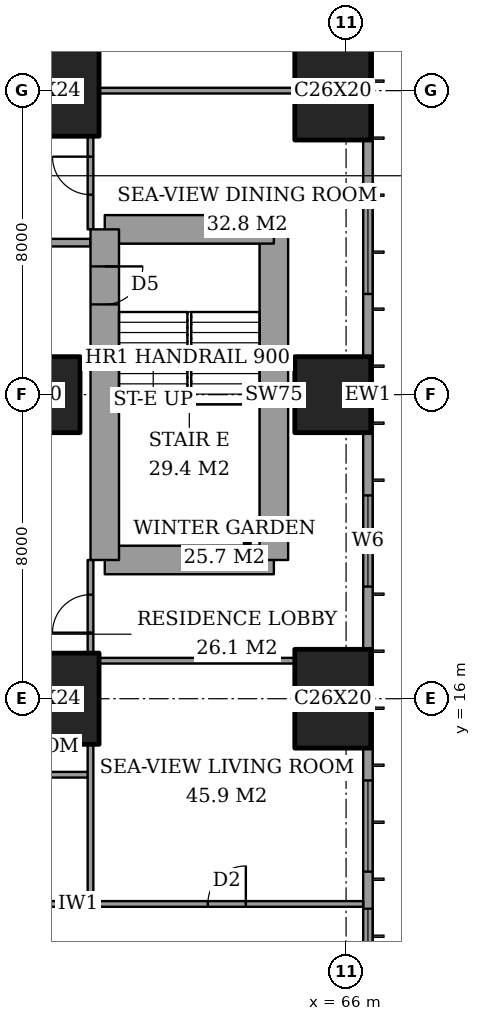
"""IFC4 building model, lengths in metres.
Left out: names, types, materials, properties, quantities, classifications, styles, units other than length and angle.
Written with IfcOpenShell. Run it as: python <this file> out.ifc"""

import sys

from ifc_helpers import new_model, si_unit, direction, frame, frame_2d, origin, origin_2d, place, context, subcontext, project, spatial, rectangle, extrude, element, fill, save


model = new_model("IFC4")
c1 = context("Model", 3, precision=1e-05, world=origin(), true_north=direction((0.0, 1.0)))
c2 = subcontext(c1, "Body", "Model", "MODEL_VIEW")
j1 = project(units=[si_unit("LENGTHUNIT", "METRE"), si_unit("PLANEANGLEUNIT", "RADIAN")], contexts=[c1])
p1 = place(None, origin())
s1 = spatial("IfcSite", under=j1, at=p1, CompositionType="ELEMENT")
p2 = place(p1, origin())
s2 = spatial("IfcBuilding", under=s1, at=p2, CompositionType="ELEMENT")
p3 = place(p2, frame((0.0, 0.0, 87.2)))
s3 = spatial("IfcBuildingStorey", under=s2, at=p3, CompositionType="ELEMENT", Elevation=87.2)
p4 = place(p3, frame((58.0, 16.0, 0.0), z_axis=(0.0, 0.0, 1.0), x_axis=(1.0, 0.0, 0.0)))
e1 = element("IfcColumn", 1, at=p4, inside=s3, PredefinedType="COLUMN", context=c2, shape_type="SweptSolid", body=[
    extrude(rectangle(XDim=3.0, YDim=2.4, at=origin_2d()), origin(), (0.0, 0.0, 1.0), 3.6),
])
p5 = place(p3, frame((58.0, 24.0, 0.0), z_axis=(0.0, 0.0, 1.0), x_axis=(1.0, 0.0, 0.0)))
e2 = element("IfcColumn", 2, at=p5, inside=s3, PredefinedType="COLUMN", context=c2, shape_type="SweptSolid", body=[
    extrude(rectangle(XDim=2.0, YDim=2.0, at=origin_2d()), origin(), (0.0, 0.0, 1.0), 3.6),
])
p6 = place(p3, frame((58.0, 32.0, 0.0), z_axis=(0.0, 0.0, 1.0), x_axis=(1.0, 0.0, 0.0)))
e3 = element("IfcColumn", 3, at=p6, inside=s3, PredefinedType="COLUMN", context=c2, shape_type="SweptSolid", body=[
    extrude(rectangle(XDim=3.0, YDim=2.4, at=origin_2d()), origin(), (0.0, 0.0, 1.0), 3.6),
])
p7 = place(p3, frame((65.65, 16.0, 0.0), z_axis=(0.0, 0.0, 1.0), x_axis=(0.0, 1.0, 0.0)))
e4 = element("IfcColumn", 4, at=p7, inside=s3, PredefinedType="COLUMN", context=c2, shape_type="SweptSolid", body=[
    extrude(rectangle(XDim=2.6, YDim=2.0, at=origin_2d()), origin(), (0.0, 0.0, 1.0), 3.6),
])
p8 = place(p3, frame((65.65, 24.0, 0.0), z_axis=(0.0, 0.0, 1.0), x_axis=(1.0, 0.0, 0.0)))
e5 = element("IfcColumn", 5, at=p8, inside=s3, PredefinedType="COLUMN", context=c2, shape_type="SweptSolid", body=[
    extrude(rectangle(XDim=2.0, YDim=2.0, at=origin_2d()), origin(), (0.0, 0.0, 1.0), 3.6),
])
p9 = place(p3, frame((65.65, 32.0, 0.0), z_axis=(0.0, 0.0, 1.0), x_axis=(0.0, 1.0, 0.0)))
e6 = element("IfcColumn", 6, at=p9, inside=s3, PredefinedType="COLUMN", context=c2, shape_type="SweptSolid", body=[
    extrude(rectangle(XDim=2.6, YDim=2.0, at=origin_2d()), origin(), (0.0, 0.0, 1.0), 3.6),
])
p10 = place(p3, frame((59.65, 19.65, 0.0), z_axis=(0.0, 0.0, 1.0), x_axis=(1.0, 0.0, 0.0)))
e7 = element("IfcWall", 7, at=p10, inside=s3, PredefinedType="SHEAR", context=c2, shape_type="SweptSolid", body=[
    extrude(rectangle(XDim=4.45, YDim=0.75, at=frame_2d((2.225, 0.0))), origin(), (0.0, 0.0, 1.0), 3.6),
])
p11 = place(p3, frame((64.1, 19.65, 0.0), z_axis=(0.0, 0.0, 1.0), x_axis=(0.0, 1.0, 0.0)))
e8 = element("IfcWall", 8, at=p11, inside=s3, PredefinedType="SHEAR", context=c2, shape_type="SweptSolid", body=[
    extrude(rectangle(XDim=8.7, YDim=0.75, at=frame_2d((4.35, 0.0))), origin(), (0.0, 0.0, 1.0), 3.6),
])
p12 = place(p3, frame((64.1, 28.35, 0.0), z_axis=(0.0, 0.0, 1.0), x_axis=(-1.0, 0.0, 0.0)))
e9 = element("IfcWall", 9, at=p12, inside=s3, PredefinedType="SHEAR", context=c2, shape_type="SweptSolid", body=[
    extrude(rectangle(XDim=4.45, YDim=0.75, at=frame_2d((2.225, 0.0))), origin(), (0.0, 0.0, 1.0), 3.6),
])
p13 = place(p3, frame((59.65, 28.35, 0.0), z_axis=(0.0, 0.0, 1.0), x_axis=(0.0, -1.0, 0.0)))
e10 = element("IfcWall", 10, at=p13, inside=s3, PredefinedType="SHEAR", context=c2, shape_type="SweptSolid", body=[
    extrude(rectangle(XDim=8.7, YDim=0.75, at=frame_2d((4.35, 0.0))), origin(), (0.0, 0.0, 1.0), 3.6),
])
p14 = place(p13, frame((0.975, 0.0, 0.0)))
e11 = element("IfcOpeningElement", 11, at=p14, cuts=e10, PredefinedType="OPENING", context=c2, shape_type="SweptSolid", body=[
    extrude(rectangle(XDim=1.0, YDim=2.1, at=frame_2d((0.5, 1.05))), frame((0.0, 0.385, 0.0), z_axis=(0.0, -1.0, 0.0), x_axis=(1.0, 0.0, 0.0)), (0.0, 0.0, 1.0), 0.77),
])
p15 = place(p3, frame((66.575, 3.175, 0.0), z_axis=(0.0, 0.0, 1.0), x_axis=(0.0, 1.0, 0.0)))
e12 = element("IfcWall", 12, at=p15, inside=s3, PredefinedType="SOLIDWALL", context=c2, shape_type="SweptSolid", body=[
    extrude(rectangle(XDim=41.65, YDim=0.25, at=frame_2d((20.825, 0.0))), origin(), (0.0, 0.0, 1.0), 3.6),
])
p16 = place(p15, frame((0.775, 0.0, 0.6)))
e13 = element("IfcOpeningElement", 13, at=p16, cuts=e12, PredefinedType="OPENING", context=c2, shape_type="SweptSolid", body=[
    extrude(rectangle(XDim=2.4, YDim=2.0, at=frame_2d((1.2, 1.0))), frame((0.0, 0.135, 0.0), z_axis=(0.0, -1.0, 0.0), x_axis=(1.0, 0.0, 0.0)), (0.0, 0.0, 1.0), 0.27),
])
p17 = place(p15, frame((6.1, 0.0, 0.6)))
e14 = element("IfcOpeningElement", 14, at=p17, cuts=e12, PredefinedType="OPENING", context=c2, shape_type="SweptSolid", body=[
    extrude(rectangle(XDim=1.2, YDim=2.0, at=frame_2d((0.6, 1.0))), frame((0.0, 0.135, 0.0), z_axis=(0.0, -1.0, 0.0), x_axis=(1.0, 0.0, 0.0)), (0.0, 0.0, 1.0), 0.27),
])
p18 = place(p15, frame((8.275, 0.0, 0.6)))
e15 = element("IfcOpeningElement", 15, at=p18, cuts=e12, PredefinedType="OPENING", context=c2, shape_type="SweptSolid", body=[
    extrude(rectangle(XDim=2.4, YDim=2.0, at=frame_2d((1.2, 1.0))), frame((0.0, 0.135, 0.0), z_axis=(0.0, -1.0, 0.0), x_axis=(1.0, 0.0, 0.0)), (0.0, 0.0, 1.0), 0.27),
])
p19 = place(p15, frame((15.775, 0.0, 0.6)))
e16 = element("IfcOpeningElement", 16, at=p19, cuts=e12, PredefinedType="OPENING", context=c2, shape_type="SweptSolid", body=[
    extrude(rectangle(XDim=2.4, YDim=2.0, at=frame_2d((1.2, 1.0))), frame((0.0, 0.135, 0.0), z_axis=(0.0, -1.0, 0.0), x_axis=(1.0, 0.0, 0.0)), (0.0, 0.0, 1.0), 0.27),
])
p20 = place(p15, frame((23.475, 0.0, 0.6)))
e17 = element("IfcOpeningElement", 17, at=p20, cuts=e12, PredefinedType="OPENING", context=c2, shape_type="SweptSolid", body=[
    extrude(rectangle(XDim=2.4, YDim=2.0, at=frame_2d((1.2, 1.0))), frame((0.0, 0.135, 0.0), z_axis=(0.0, -1.0, 0.0), x_axis=(1.0, 0.0, 0.0)), (0.0, 0.0, 1.0), 0.27),
])
p21 = place(p15, frame((30.975, 0.0, 0.6)))
e18 = element("IfcOpeningElement", 18, at=p21, cuts=e12, PredefinedType="OPENING", context=c2, shape_type="SweptSolid", body=[
    extrude(rectangle(XDim=2.4, YDim=2.0, at=frame_2d((1.2, 1.0))), frame((0.0, 0.135, 0.0), z_axis=(0.0, -1.0, 0.0), x_axis=(1.0, 0.0, 0.0)), (0.0, 0.0, 1.0), 0.27),
])
p22 = place(p15, frame((34.5, 0.0, 0.6)))
e19 = element("IfcOpeningElement", 19, at=p22, cuts=e12, PredefinedType="OPENING", context=c2, shape_type="SweptSolid", body=[
    extrude(rectangle(XDim=1.2, YDim=2.0, at=frame_2d((0.6, 1.0))), frame((0.0, 0.135, 0.0), z_axis=(0.0, -1.0, 0.0), x_axis=(1.0, 0.0, 0.0)), (0.0, 0.0, 1.0), 0.27),
])
p23 = place(p15, frame((38.475, 0.0, 0.6)))
e20 = element("IfcOpeningElement", 20, at=p23, cuts=e12, PredefinedType="OPENING", context=c2, shape_type="SweptSolid", body=[
    extrude(rectangle(XDim=2.4, YDim=2.0, at=frame_2d((1.2, 1.0))), frame((0.0, 0.135, 0.0), z_axis=(0.0, -1.0, 0.0), x_axis=(1.0, 0.0, 0.0)), (0.0, 0.0, 1.0), 0.27),
])
p24 = place(p3, frame((41.439, 10.6, 0.0), z_axis=(0.0, 0.0, 1.0), x_axis=(1.0, 0.0, 0.0)))
e21 = element("IfcWall", 21, at=p24, inside=s3, PredefinedType="PARTITIONING", context=c2, shape_type="SweptSolid", body=[
    extrude(rectangle(XDim=25.011, YDim=0.15, at=frame_2d((12.505, 0.0))), origin(), (0.0, 0.0, 1.0), 3.25),
])
p25 = place(p24, frame((10.761, 0.0, 0.0)))
e22 = element("IfcOpeningElement", 22, at=p25, cuts=e21, PredefinedType="OPENING", context=c2, shape_type="SweptSolid", body=[
    extrude(rectangle(XDim=1.0, YDim=2.1, at=frame_2d((0.5, 1.05))), frame((0.0, 0.085, 0.0), z_axis=(0.0, -1.0, 0.0), x_axis=(1.0, 0.0, 0.0)), (0.0, 0.0, 1.0), 0.17),
])
p26 = place(p24, frame((20.924, 0.0, 0.0)))
e23 = element("IfcOpeningElement", 23, at=p26, cuts=e21, PredefinedType="OPENING", context=c2, shape_type="SweptSolid", body=[
    extrude(rectangle(XDim=1.0, YDim=2.1, at=frame_2d((0.5, 1.05))), frame((0.0, 0.085, 0.0), z_axis=(0.0, -1.0, 0.0), x_axis=(1.0, 0.0, 0.0)), (0.0, 0.0, 1.0), 0.17),
])
p27 = place(p24, frame((15.749, 0.0, 0.0)))
e24 = element("IfcOpeningElement", 24, at=p27, cuts=e21, PredefinedType="OPENING", context=c2, shape_type="SweptSolid", body=[
    extrude(rectangle(XDim=0.9, YDim=2.1, at=frame_2d((0.45, 1.05))), frame((0.0, 0.085, 0.0), z_axis=(0.0, -1.0, 0.0), x_axis=(1.0, 0.0, 0.0)), (0.0, 0.0, 1.0), 0.17),
])
p28 = place(p24, frame((12.961, 0.0, 0.0)))
e25 = element("IfcOpeningElement", 25, at=p28, cuts=e21, PredefinedType="OPENING", context=c2, shape_type="SweptSolid", body=[
    extrude(rectangle(XDim=1.0, YDim=2.1, at=frame_2d((0.5, 1.05))), frame((0.0, 0.085, 0.0), z_axis=(0.0, -1.0, 0.0), x_axis=(1.0, 0.0, 0.0)), (0.0, 0.0, 1.0), 0.17),
])
p29 = place(p24, frame((7.861, 0.0, 0.0)))
e26 = element("IfcOpeningElement", 26, at=p29, cuts=e21, PredefinedType="OPENING", context=c2, shape_type="SweptSolid", body=[
    extrude(rectangle(XDim=1.0, YDim=2.1, at=frame_2d((0.5, 1.05))), frame((0.0, 0.085, 0.0), z_axis=(0.0, -1.0, 0.0), x_axis=(1.0, 0.0, 0.0)), (0.0, 0.0, 1.0), 0.17),
])
p30 = place(p24, frame((2.836, 0.0, 0.0)))
e27 = element("IfcOpeningElement", 27, at=p30, cuts=e21, PredefinedType="OPENING", context=c2, shape_type="SweptSolid", body=[
    extrude(rectangle(XDim=1.0, YDim=2.1, at=frame_2d((0.5, 1.05))), frame((0.0, 0.085, 0.0), z_axis=(0.0, -1.0, 0.0), x_axis=(1.0, 0.0, 0.0)), (0.0, 0.0, 1.0), 0.17),
])
p31 = place(p3, frame((56.0, 14.0, 0.0), z_axis=(0.0, 0.0, 1.0), x_axis=(1.0, 0.0, 0.0)))
e28 = element("IfcWall", 28, at=p31, inside=s3, PredefinedType="PARTITIONING", context=c2, shape_type="SweptSolid", body=[
    extrude(rectangle(XDim=3.275, YDim=0.15, at=frame_2d((1.637, 0.0))), origin(), (0.0, 0.0, 1.0), 3.25),
])
p32 = place(p3, frame((59.5, 17.0, 0.0), z_axis=(0.0, 0.0, 1.0), x_axis=(1.0, 0.0, 0.0)))
e29 = element("IfcWall", 29, at=p32, inside=s3, PredefinedType="PARTITIONING", context=c2, shape_type="SweptSolid", body=[
    extrude(rectangle(XDim=5.15, YDim=0.15, at=frame_2d((2.575, 0.0))), origin(), (0.0, 0.0, 1.0), 3.25),
])
p33 = place(p3, frame((42.0, 28.0, 0.0), z_axis=(0.0, 0.0, 1.0), x_axis=(1.0, 0.0, 0.0)))
e30 = element("IfcWall", 30, at=p33, inside=s3, PredefinedType="PARTITIONING", context=c2, shape_type="SweptSolid", body=[
    extrude(rectangle(XDim=17.275, YDim=0.2, at=frame_2d((8.637, 0.0))), origin(), (0.0, 0.0, 1.0), 3.25),
])
p34 = place(p33, frame((9.4, 0.0, 0.0)))
e31 = element("IfcOpeningElement", 31, at=p34, cuts=e30, PredefinedType="OPENING", context=c2, shape_type="SweptSolid", body=[
    extrude(rectangle(XDim=1.2, YDim=2.4, at=frame_2d((0.6, 1.2))), frame((0.0, 0.11, 0.0), z_axis=(0.0, -1.0, 0.0), x_axis=(1.0, 0.0, 0.0)), (0.0, 0.0, 1.0), 0.22),
])
p35 = place(p3, frame((59.5, 32.0, 0.0), z_axis=(0.0, 0.0, 1.0), x_axis=(1.0, 0.0, 0.0)))
e32 = element("IfcWall", 32, at=p35, inside=s3, PredefinedType="PARTITIONING", context=c2, shape_type="SweptSolid", body=[
    extrude(rectangle(XDim=5.15, YDim=0.15, at=frame_2d((2.575, 0.0))), origin(), (0.0, 0.0, 1.0), 3.25),
])
p36 = place(p3, frame((59.275, 10.6, 0.0), z_axis=(0.0, 0.0, 1.0), x_axis=(0.0, 1.0, 0.0)))
e33 = element("IfcWall", 33, at=p36, inside=s3, PredefinedType="PARTITIONING", context=c2, shape_type="SweptSolid", body=[
    extrude(rectangle(XDim=4.2, YDim=0.15, at=frame_2d((2.1, 0.0))), origin(), (0.0, 0.0, 1.0), 3.25),
])
p37 = place(p3, frame((59.275, 17.2, 0.0), z_axis=(0.0, 0.0, 1.0), x_axis=(0.0, 1.0, 0.0)))
e34 = element("IfcWall", 34, at=p37, inside=s3, PredefinedType="PARTITIONING", context=c2, shape_type="SweptSolid", body=[
    extrude(rectangle(XDim=2.45, YDim=0.15, at=frame_2d((1.225, 0.0))), origin(), (0.0, 0.0, 1.0), 3.25),
])
p38 = place(p37, frame((0.538, 0.0, 0.0)))
e35 = element("IfcOpeningElement", 35, at=p38, cuts=e34, PredefinedType="OPENING", context=c2, shape_type="SweptSolid", body=[
    extrude(rectangle(XDim=1.0, YDim=2.1, at=frame_2d((0.5, 1.05))), frame((0.0, 0.085, 0.0), z_axis=(0.0, -1.0, 0.0), x_axis=(1.0, 0.0, 0.0)), (0.0, 0.0, 1.0), 0.17),
])
p39 = place(p3, frame((59.275, 28.35, 0.0), z_axis=(0.0, 0.0, 1.0), x_axis=(0.0, 1.0, 0.0)))
e36 = element("IfcWall", 36, at=p39, inside=s3, PredefinedType="PARTITIONING", context=c2, shape_type="SweptSolid", body=[
    extrude(rectangle(XDim=2.45, YDim=0.15, at=frame_2d((1.225, 0.0))), origin(), (0.0, 0.0, 1.0), 3.25),
])
p40 = place(p39, frame((0.913, 0.0, 0.0)))
e37 = element("IfcOpeningElement", 37, at=p40, cuts=e36, PredefinedType="OPENING", context=c2, shape_type="SweptSolid", body=[
    extrude(rectangle(XDim=1.0, YDim=2.1, at=frame_2d((0.5, 1.05))), frame((0.0, 0.085, 0.0), z_axis=(0.0, -1.0, 0.0), x_axis=(1.0, 0.0, 0.0)), (0.0, 0.0, 1.0), 0.17),
])
p41 = place(p17, origin())
e38 = element("IfcWindow", 38, at=p41, inside=s3, PartitioningType="SINGLE_PANEL", PredefinedType="WINDOW", context=c2, shape_type="SweptSolid", body=[
    extrude(rectangle(XDim=1.2, YDim=2.0, at=frame_2d((0.6, 1.0))), frame((0.0, 0.03, 0.0), z_axis=(0.0, -1.0, 0.0), x_axis=(1.0, 0.0, 0.0)), (0.0, 0.0, 1.0), 0.06),
])
fill(e14, e38)
p42 = place(p18, origin())
e39 = element("IfcWindow", 39, at=p42, inside=s3, PartitioningType="SINGLE_PANEL", PredefinedType="WINDOW", context=c2, shape_type="SweptSolid", body=[
    extrude(rectangle(XDim=2.4, YDim=2.0, at=frame_2d((1.2, 1.0))), frame((0.0, 0.03, 0.0), z_axis=(0.0, -1.0, 0.0), x_axis=(1.0, 0.0, 0.0)), (0.0, 0.0, 1.0), 0.06),
])
fill(e15, e39)
p43 = place(p19, origin())
e40 = element("IfcWindow", 40, at=p43, inside=s3, PartitioningType="SINGLE_PANEL", PredefinedType="WINDOW", context=c2, shape_type="SweptSolid", body=[
    extrude(rectangle(XDim=2.4, YDim=2.0, at=frame_2d((1.2, 1.0))), frame((0.0, 0.03, 0.0), z_axis=(0.0, -1.0, 0.0), x_axis=(1.0, 0.0, 0.0)), (0.0, 0.0, 1.0), 0.06),
])
fill(e16, e40)
p44 = place(p20, origin())
e41 = element("IfcWindow", 41, at=p44, inside=s3, PartitioningType="SINGLE_PANEL", PredefinedType="WINDOW", context=c2, shape_type="SweptSolid", body=[
    extrude(rectangle(XDim=2.4, YDim=2.0, at=frame_2d((1.2, 1.0))), frame((0.0, 0.03, 0.0), z_axis=(0.0, -1.0, 0.0), x_axis=(1.0, 0.0, 0.0)), (0.0, 0.0, 1.0), 0.06),
])
fill(e17, e41)
p45 = place(p26, origin())
e42 = element("IfcDoor", 42, at=p45, inside=s3, OperationType="SINGLE_SWING_LEFT", PredefinedType="DOOR", context=c2, shape_type="SweptSolid", body=[
    extrude(rectangle(XDim=1.0, YDim=2.1, at=frame_2d((0.5, 1.05))), frame((0.0, 0.025, 0.0), z_axis=(0.0, -1.0, 0.0), x_axis=(1.0, 0.0, 0.0)), (0.0, 0.0, 1.0), 0.05),
])
fill(e23, e42)
p46 = place(p38, origin())
e43 = element("IfcDoor", 43, at=p46, inside=s3, OperationType="SINGLE_SWING_RIGHT", PredefinedType="DOOR", context=c2, shape_type="SweptSolid", body=[
    extrude(rectangle(XDim=1.0, YDim=2.1, at=frame_2d((0.5, 1.05))), frame((0.0, 0.025, 0.0), z_axis=(0.0, -1.0, 0.0), x_axis=(1.0, 0.0, 0.0)), (0.0, 0.0, 1.0), 0.05),
])
fill(e35, e43)
p47 = place(p40, origin())
e44 = element("IfcDoor", 44, at=p47, inside=s3, OperationType="SINGLE_SWING_LEFT", PredefinedType="DOOR", context=c2, shape_type="SweptSolid", body=[
    extrude(rectangle(XDim=1.0, YDim=2.1, at=frame_2d((0.5, 1.05))), frame((0.0, 0.025, 0.0), z_axis=(0.0, -1.0, 0.0), x_axis=(1.0, 0.0, 0.0)), (0.0, 0.0, 1.0), 0.05),
])
fill(e37, e44)
p48 = place(p14, origin())
e45 = element("IfcDoor", 45, at=p48, inside=s3, OperationType="SINGLE_SWING_RIGHT", PredefinedType="DOOR", context=c2, shape_type="SweptSolid", body=[
    extrude(rectangle(XDim=1.0, YDim=2.1, at=frame_2d((0.5, 1.05))), frame((0.0, 0.025, 0.0), z_axis=(0.0, -1.0, 0.0), x_axis=(1.0, 0.0, 0.0)), (0.0, 0.0, 1.0), 0.05),
])
fill(e11, e45)
save(model, sys.argv[1])
